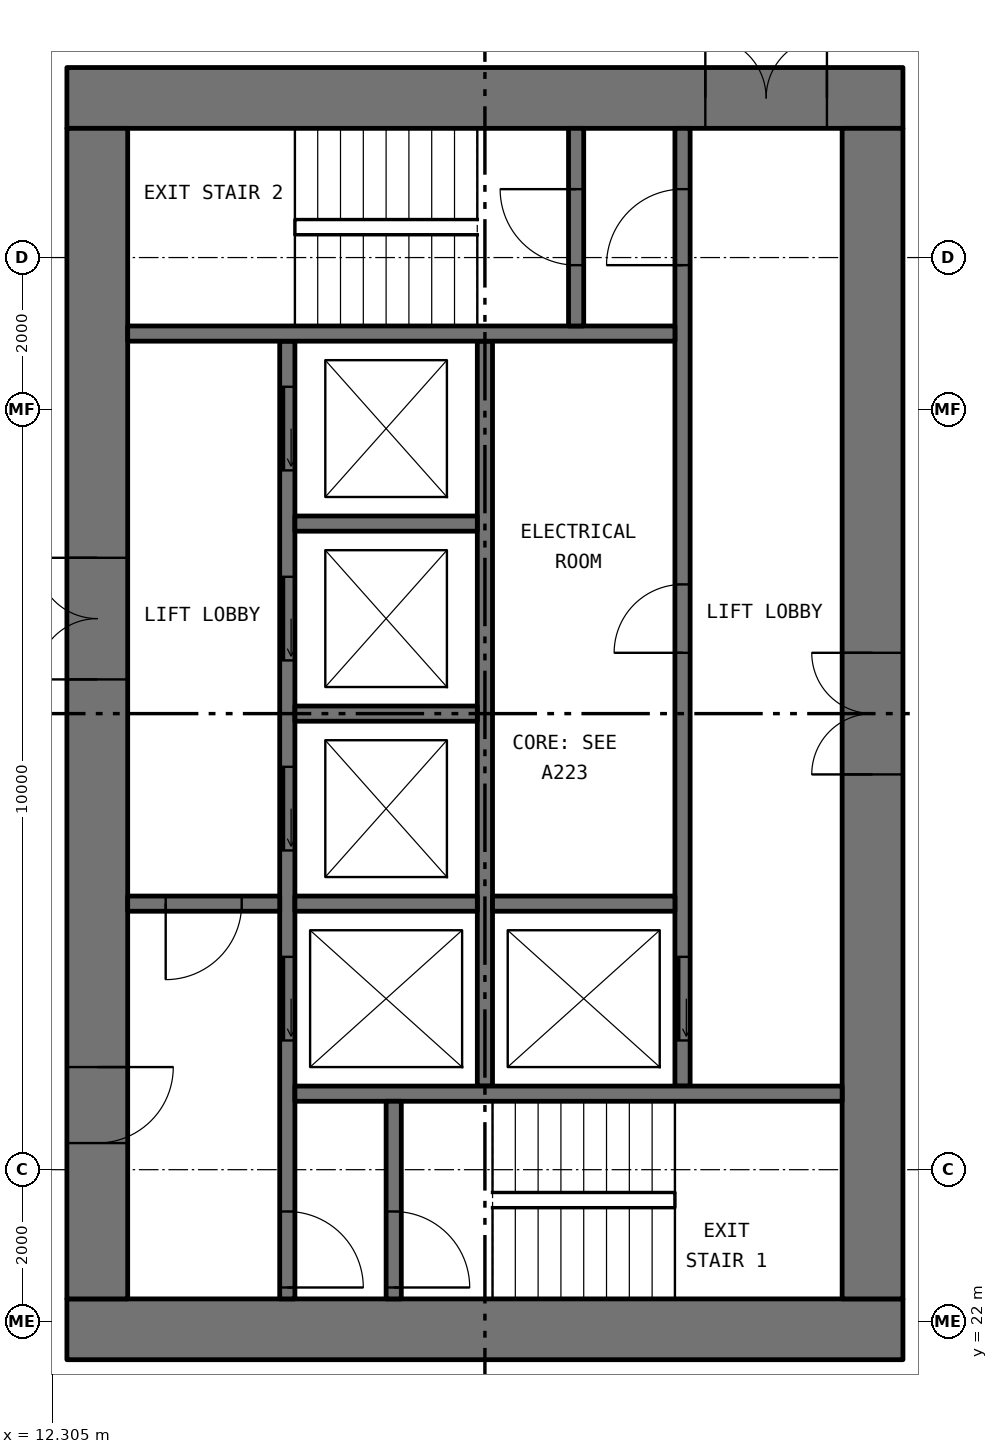
"""IFC4 building model, lengths in metres.
Left out: names, types, materials, properties, quantities, classifications, styles, units other than length and angle.
Written with IfcOpenShell. Run it as: python <this file> out.ifc"""

import sys

from ifc_helpers import new_model, si_unit, direction, frame, frame_2d, origin, place, context, subcontext, project, spatial, rectangle, extrude, element, fill, save


model = new_model("IFC4")
c1 = context("Model", 3, precision=1e-05, world=origin(), true_north=direction((0.0, 1.0)))
c2 = subcontext(c1, "Body", "Model", "MODEL_VIEW")
j1 = project(units=[si_unit("LENGTHUNIT", "METRE"), si_unit("PLANEANGLEUNIT", "RADIAN")], contexts=[c1])
p1 = place(None, origin())
s1 = spatial("IfcSite", under=j1, at=p1, CompositionType="ELEMENT")
p2 = place(p1, origin())
s2 = spatial("IfcBuilding", under=s1, at=p2, CompositionType="ELEMENT")
p3 = place(p2, frame((0.0, 0.0, 88.65)))
s3 = spatial("IfcBuildingStorey", under=s2, at=p3, CompositionType="ELEMENT", Elevation=88.65)
p4 = place(p3, frame((12.5, 21.9, 0.0), z_axis=(0.0, 0.0, 1.0), x_axis=(1.0, 0.0, 0.0)))
e1 = element("IfcWall", 1, at=p4, inside=s3, PredefinedType="SHEAR", context=c2, shape_type="SweptSolid", body=[
    extrude(rectangle(XDim=11.0, YDim=0.8, at=frame_2d((5.5, 0.0))), origin(), (0.0, 0.0, 1.0), 3.05),
])
p5 = place(p3, frame((12.5, 38.1, 0.0), z_axis=(0.0, 0.0, 1.0), x_axis=(1.0, 0.0, 0.0)))
e2 = element("IfcWall", 2, at=p5, inside=s3, PredefinedType="SHEAR", context=c2, shape_type="SweptSolid", body=[
    extrude(rectangle(XDim=11.0, YDim=0.8, at=frame_2d((5.5, 0.0))), origin(), (0.0, 0.0, 1.0), 3.05),
])
p6 = place(p5, frame((8.4, 0.0, 0.0)))
e3 = element("IfcOpeningElement", 3, at=p6, cuts=e2, PredefinedType="OPENING", context=c2, shape_type="SweptSolid", body=[
    extrude(rectangle(XDim=1.6, YDim=2.1, at=frame_2d((0.8, 1.05))), frame((0.0, 0.41, 0.0), z_axis=(0.0, -1.0, 0.0), x_axis=(1.0, 0.0, 0.0)), (0.0, 0.0, 1.0), 0.82),
])
p7 = place(p3, frame((12.9, 22.3, 0.0), z_axis=(0.0, 0.0, 1.0), x_axis=(0.0, 1.0, 0.0)))
e4 = element("IfcWall", 4, at=p7, inside=s3, PredefinedType="SHEAR", context=c2, shape_type="SweptSolid", body=[
    extrude(rectangle(XDim=15.4, YDim=0.8, at=frame_2d((7.7, 0.0))), origin(), (0.0, 0.0, 1.0), 3.05),
])
p8 = place(p7, frame((8.15, 0.0, 0.0)))
e5 = element("IfcOpeningElement", 5, at=p8, cuts=e4, PredefinedType="OPENING", context=c2, shape_type="SweptSolid", body=[
    extrude(rectangle(XDim=1.6, YDim=2.1, at=frame_2d((0.8, 1.05))), frame((0.0, 0.41, 0.0), z_axis=(0.0, -1.0, 0.0), x_axis=(1.0, 0.0, 0.0)), (0.0, 0.0, 1.0), 0.82),
])
p9 = place(p7, frame((2.05, 0.0, 0.0)))
e6 = element("IfcOpeningElement", 6, at=p9, cuts=e4, PredefinedType="OPENING", context=c2, shape_type="SweptSolid", body=[
    extrude(rectangle(XDim=1.0, YDim=2.1, at=frame_2d((0.5, 1.05))), frame((0.0, 0.41, 0.0), z_axis=(0.0, -1.0, 0.0), x_axis=(1.0, 0.0, 0.0)), (0.0, 0.0, 1.0), 0.82),
])
p10 = place(p3, frame((23.1, 22.3, 0.0), z_axis=(0.0, 0.0, 1.0), x_axis=(0.0, 1.0, 0.0)))
e7 = element("IfcWall", 7, at=p10, inside=s3, PredefinedType="SHEAR", context=c2, shape_type="SweptSolid", body=[
    extrude(rectangle(XDim=15.4, YDim=0.8, at=frame_2d((7.7, 0.0))), origin(), (0.0, 0.0, 1.0), 3.05),
])
p11 = place(p10, frame((6.9, 0.0, 0.0)))
e8 = element("IfcOpeningElement", 8, at=p11, cuts=e7, PredefinedType="OPENING", context=c2, shape_type="SweptSolid", body=[
    extrude(rectangle(XDim=1.6, YDim=2.1, at=frame_2d((0.8, 1.05))), frame((0.0, 0.41, 0.0), z_axis=(0.0, -1.0, 0.0), x_axis=(1.0, 0.0, 0.0)), (0.0, 0.0, 1.0), 0.82),
])
p12 = place(p3, frame((15.4, 22.3, 0.0), z_axis=(0.0, 0.0, 1.0), x_axis=(0.0, 1.0, 0.0)))
e9 = element("IfcWall", 9, at=p12, inside=s3, PredefinedType="SOLIDWALL", context=c2, shape_type="SweptSolid", body=[
    extrude(rectangle(XDim=12.6, YDim=0.2, at=frame_2d((6.3, 0.0))), origin(), (0.0, 0.0, 1.0), 3.05),
])
p13 = place(p12, frame((3.4, 0.0, 0.0)))
e10 = element("IfcOpeningElement", 10, at=p13, cuts=e9, PredefinedType="OPENING", context=c2, shape_type="SweptSolid", body=[
    extrude(rectangle(XDim=1.1, YDim=2.1, at=frame_2d((0.55, 1.05))), frame((0.0, 0.11, 0.0), z_axis=(0.0, -1.0, 0.0), x_axis=(1.0, 0.0, 0.0)), (0.0, 0.0, 1.0), 0.22),
])
p14 = place(p12, frame((5.9, 0.0, 0.0)))
e11 = element("IfcOpeningElement", 11, at=p14, cuts=e9, PredefinedType="OPENING", context=c2, shape_type="SweptSolid", body=[
    extrude(rectangle(XDim=1.1, YDim=2.1, at=frame_2d((0.55, 1.05))), frame((0.0, 0.11, 0.0), z_axis=(0.0, -1.0, 0.0), x_axis=(1.0, 0.0, 0.0)), (0.0, 0.0, 1.0), 0.22),
])
p15 = place(p12, frame((8.4, 0.0, 0.0)))
e12 = element("IfcOpeningElement", 12, at=p15, cuts=e9, PredefinedType="OPENING", context=c2, shape_type="SweptSolid", body=[
    extrude(rectangle(XDim=1.1, YDim=2.1, at=frame_2d((0.55, 1.05))), frame((0.0, 0.11, 0.0), z_axis=(0.0, -1.0, 0.0), x_axis=(1.0, 0.0, 0.0)), (0.0, 0.0, 1.0), 0.22),
])
p16 = place(p12, frame((10.9, 0.0, 0.0)))
e13 = element("IfcOpeningElement", 13, at=p16, cuts=e9, PredefinedType="OPENING", context=c2, shape_type="SweptSolid", body=[
    extrude(rectangle(XDim=1.1, YDim=2.1, at=frame_2d((0.55, 1.05))), frame((0.0, 0.11, 0.0), z_axis=(0.0, -1.0, 0.0), x_axis=(1.0, 0.0, 0.0)), (0.0, 0.0, 1.0), 0.22),
])
p17 = place(p12, frame((0.15, 0.0, 0.0)))
e14 = element("IfcOpeningElement", 14, at=p17, cuts=e9, PredefinedType="OPENING", context=c2, shape_type="SweptSolid", body=[
    extrude(rectangle(XDim=1.0, YDim=2.1, at=frame_2d((0.5, 1.05))), frame((0.0, 0.11, 0.0), z_axis=(0.0, -1.0, 0.0), x_axis=(1.0, 0.0, 0.0)), (0.0, 0.0, 1.0), 0.22),
])
p18 = place(p3, frame((20.6, 25.1, 0.0), z_axis=(0.0, 0.0, 1.0), x_axis=(0.0, 1.0, 0.0)))
e15 = element("IfcWall", 15, at=p18, inside=s3, PredefinedType="SOLIDWALL", context=c2, shape_type="SweptSolid", body=[
    extrude(rectangle(XDim=12.6, YDim=0.2, at=frame_2d((6.3, 0.0))), origin(), (0.0, 0.0, 1.0), 3.05),
])
p19 = place(p18, frame((0.6, 0.0, 0.0)))
e16 = element("IfcOpeningElement", 16, at=p19, cuts=e15, PredefinedType="OPENING", context=c2, shape_type="SweptSolid", body=[
    extrude(rectangle(XDim=1.1, YDim=2.1, at=frame_2d((0.55, 1.05))), frame((0.0, 0.11, 0.0), z_axis=(0.0, -1.0, 0.0), x_axis=(1.0, 0.0, 0.0)), (0.0, 0.0, 1.0), 0.22),
])
p20 = place(p18, frame((10.8, 0.0, 0.0)))
e17 = element("IfcOpeningElement", 17, at=p20, cuts=e15, PredefinedType="OPENING", context=c2, shape_type="SweptSolid", body=[
    extrude(rectangle(XDim=1.0, YDim=2.1, at=frame_2d((0.5, 1.05))), frame((0.0, 0.11, 0.0), z_axis=(0.0, -1.0, 0.0), x_axis=(1.0, 0.0, 0.0)), (0.0, 0.0, 1.0), 0.22),
])
p21 = place(p18, frame((5.7, 0.0, 0.0)))
e18 = element("IfcOpeningElement", 18, at=p21, cuts=e15, PredefinedType="OPENING", context=c2, shape_type="SweptSolid", body=[
    extrude(rectangle(XDim=0.9, YDim=2.1, at=frame_2d((0.45, 1.05))), frame((0.0, 0.11, 0.0), z_axis=(0.0, -1.0, 0.0), x_axis=(1.0, 0.0, 0.0)), (0.0, 0.0, 1.0), 0.22),
])
p22 = place(p3, frame((18.0, 25.1, 0.0), z_axis=(0.0, 0.0, 1.0), x_axis=(0.0, 1.0, 0.0)))
e19 = element("IfcWall", 19, at=p22, inside=s3, PredefinedType="SOLIDWALL", context=c2, shape_type="SweptSolid", body=[
    extrude(rectangle(XDim=9.8, YDim=0.2, at=frame_2d((4.9, 0.0))), origin(), (0.0, 0.0, 1.0), 3.05),
])
for number, where, z_axis, x_axis in (
    (20, (15.5, 25.0, 0.0), (0.0, 0.0, 1.0), (1.0, 0.0, 0.0)),
    (21, (13.3, 35.0, 0.0), (0.0, 0.0, 1.0), (1.0, 0.0, 0.0)),
):
    element("IfcWall", number, at=place(p3, frame(where, z_axis=z_axis, x_axis=x_axis)), inside=s3, PredefinedType="SOLIDWALL", context=c2, shape_type="SweptSolid", body=[
        extrude(rectangle(XDim=7.2, YDim=0.2, at=frame_2d((3.6, 0.0))), origin(), (0.0, 0.0, 1.0), 3.05),
    ])
p23 = place(p3, frame((13.3, 27.5, 0.0), z_axis=(0.0, 0.0, 1.0), x_axis=(1.0, 0.0, 0.0)))
e22 = element("IfcWall", 22, at=p23, inside=s3, PredefinedType="SOLIDWALL", context=c2, shape_type="SweptSolid", body=[
    extrude(rectangle(XDim=2.0, YDim=0.2, at=frame_2d((1.0, 0.0))), origin(), (0.0, 0.0, 1.0), 3.05),
])
p24 = place(p23, frame((0.5, 0.0, 0.0)))
e23 = element("IfcOpeningElement", 23, at=p24, cuts=e22, PredefinedType="OPENING", context=c2, shape_type="SweptSolid", body=[
    extrude(rectangle(XDim=1.0, YDim=2.1, at=frame_2d((0.5, 1.05))), frame((0.0, 0.11, 0.0), z_axis=(0.0, -1.0, 0.0), x_axis=(1.0, 0.0, 0.0)), (0.0, 0.0, 1.0), 0.22),
])
p25 = place(p3, frame((16.8, 22.3, 0.0), z_axis=(0.0, 0.0, 1.0), x_axis=(0.0, 1.0, 0.0)))
e24 = element("IfcWall", 24, at=p25, inside=s3, PredefinedType="SOLIDWALL", context=c2, shape_type="SweptSolid", body=[
    extrude(rectangle(XDim=2.6, YDim=0.2, at=frame_2d((1.3, 0.0))), origin(), (0.0, 0.0, 1.0), 3.05),
])
p26 = place(p25, frame((0.15, 0.0, 0.0)))
e25 = element("IfcOpeningElement", 25, at=p26, cuts=e24, PredefinedType="OPENING", context=c2, shape_type="SweptSolid", body=[
    extrude(rectangle(XDim=1.0, YDim=2.1, at=frame_2d((0.5, 1.05))), frame((0.0, 0.11, 0.0), z_axis=(0.0, -1.0, 0.0), x_axis=(1.0, 0.0, 0.0)), (0.0, 0.0, 1.0), 0.22),
])
p27 = place(p3, frame((19.2, 35.1, 0.0), z_axis=(0.0, 0.0, 1.0), x_axis=(0.0, 1.0, 0.0)))
e26 = element("IfcWall", 26, at=p27, inside=s3, PredefinedType="SOLIDWALL", context=c2, shape_type="SweptSolid", body=[
    extrude(rectangle(XDim=2.6, YDim=0.2, at=frame_2d((1.3, 0.0))), origin(), (0.0, 0.0, 1.0), 3.05),
])
p28 = place(p27, frame((0.8, 0.0, 0.0)))
e27 = element("IfcOpeningElement", 27, at=p28, cuts=e26, PredefinedType="OPENING", context=c2, shape_type="SweptSolid", body=[
    extrude(rectangle(XDim=1.0, YDim=2.1, at=frame_2d((0.5, 1.05))), frame((0.0, 0.11, 0.0), z_axis=(0.0, -1.0, 0.0), x_axis=(1.0, 0.0, 0.0)), (0.0, 0.0, 1.0), 0.22),
])
for number, where, z_axis, x_axis in (
    (28, (15.5, 27.5, 0.0), (0.0, 0.0, 1.0), (1.0, 0.0, 0.0)),
    (29, (15.5, 30.0, 0.0), (0.0, 0.0, 1.0), (1.0, 0.0, 0.0)),
    (30, (15.5, 32.5, 0.0), (0.0, 0.0, 1.0), (1.0, 0.0, 0.0)),
    (31, (18.1, 27.5, 0.0), (0.0, 0.0, 1.0), (1.0, 0.0, 0.0)),
):
    element("IfcWall", number, at=place(p3, frame(where, z_axis=z_axis, x_axis=x_axis)), inside=s3, PredefinedType="SOLIDWALL", context=c2, shape_type="SweptSolid", body=[
        extrude(rectangle(XDim=2.4, YDim=0.2, at=frame_2d((1.2, 0.0))), origin(), (0.0, 0.0, 1.0), 3.05),
    ])
p29 = place(p19, origin())
e32 = element("IfcDoor", 32, at=p29, inside=s3, OperationType="SLIDING_TO_LEFT", PredefinedType="DOOR", context=c2, shape_type="SweptSolid", body=[
    extrude(rectangle(XDim=1.1, YDim=2.1, at=frame_2d((0.55, 1.05))), frame((0.0, 0.025, 0.0), z_axis=(0.0, -1.0, 0.0), x_axis=(1.0, 0.0, 0.0)), (0.0, 0.0, 1.0), 0.05),
])
fill(e16, e32)
p30 = place(p13, origin())
e33 = element("IfcDoor", 33, at=p30, inside=s3, OperationType="SLIDING_TO_LEFT", PredefinedType="DOOR", context=c2, shape_type="SweptSolid", body=[
    extrude(rectangle(XDim=1.1, YDim=2.1, at=frame_2d((0.55, 1.05))), frame((0.0, 0.025, 0.0), z_axis=(0.0, -1.0, 0.0), x_axis=(1.0, 0.0, 0.0)), (0.0, 0.0, 1.0), 0.05),
])
fill(e10, e33)
p31 = place(p14, origin())
e34 = element("IfcDoor", 34, at=p31, inside=s3, OperationType="SLIDING_TO_LEFT", PredefinedType="DOOR", context=c2, shape_type="SweptSolid", body=[
    extrude(rectangle(XDim=1.1, YDim=2.1, at=frame_2d((0.55, 1.05))), frame((0.0, 0.025, 0.0), z_axis=(0.0, -1.0, 0.0), x_axis=(1.0, 0.0, 0.0)), (0.0, 0.0, 1.0), 0.05),
])
fill(e11, e34)
p32 = place(p15, origin())
e35 = element("IfcDoor", 35, at=p32, inside=s3, OperationType="SLIDING_TO_LEFT", PredefinedType="DOOR", context=c2, shape_type="SweptSolid", body=[
    extrude(rectangle(XDim=1.1, YDim=2.1, at=frame_2d((0.55, 1.05))), frame((0.0, 0.025, 0.0), z_axis=(0.0, -1.0, 0.0), x_axis=(1.0, 0.0, 0.0)), (0.0, 0.0, 1.0), 0.05),
])
fill(e12, e35)
p33 = place(p16, origin())
e36 = element("IfcDoor", 36, at=p33, inside=s3, OperationType="SLIDING_TO_LEFT", PredefinedType="DOOR", context=c2, shape_type="SweptSolid", body=[
    extrude(rectangle(XDim=1.1, YDim=2.1, at=frame_2d((0.55, 1.05))), frame((0.0, 0.025, 0.0), z_axis=(0.0, -1.0, 0.0), x_axis=(1.0, 0.0, 0.0)), (0.0, 0.0, 1.0), 0.05),
])
fill(e13, e36)
p34 = place(p26, frame((1.0, 0.0, 0.0), x_axis=(-1.0, 0.0, 0.0)))
e37 = element("IfcDoor", 37, at=p34, inside=s3, OperationType="SINGLE_SWING_LEFT", PredefinedType="DOOR", context=c2, shape_type="SweptSolid", body=[
    extrude(rectangle(XDim=1.0, YDim=2.1, at=frame_2d((0.5, 1.05))), frame((0.0, 0.025, 0.0), z_axis=(0.0, -1.0, 0.0), x_axis=(1.0, 0.0, 0.0)), (0.0, 0.0, 1.0), 0.05),
])
fill(e25, e37)
p35 = place(p17, frame((1.0, 0.0, 0.0), x_axis=(-1.0, 0.0, 0.0)))
e38 = element("IfcDoor", 38, at=p35, inside=s3, OperationType="SINGLE_SWING_LEFT", PredefinedType="DOOR", context=c2, shape_type="SweptSolid", body=[
    extrude(rectangle(XDim=1.0, YDim=2.1, at=frame_2d((0.5, 1.05))), frame((0.0, 0.025, 0.0), z_axis=(0.0, -1.0, 0.0), x_axis=(1.0, 0.0, 0.0)), (0.0, 0.0, 1.0), 0.05),
])
fill(e14, e38)
p36 = place(p20, origin())
e39 = element("IfcDoor", 39, at=p36, inside=s3, OperationType="SINGLE_SWING_RIGHT", PredefinedType="DOOR", context=c2, shape_type="SweptSolid", body=[
    extrude(rectangle(XDim=1.0, YDim=2.1, at=frame_2d((0.5, 1.05))), frame((0.0, 0.025, 0.0), z_axis=(0.0, -1.0, 0.0), x_axis=(1.0, 0.0, 0.0)), (0.0, 0.0, 1.0), 0.05),
])
fill(e17, e39)
p37 = place(p28, origin())
e40 = element("IfcDoor", 40, at=p37, inside=s3, OperationType="SINGLE_SWING_LEFT", PredefinedType="DOOR", context=c2, shape_type="SweptSolid", body=[
    extrude(rectangle(XDim=1.0, YDim=2.1, at=frame_2d((0.5, 1.05))), frame((0.0, 0.025, 0.0), z_axis=(0.0, -1.0, 0.0), x_axis=(1.0, 0.0, 0.0)), (0.0, 0.0, 1.0), 0.05),
])
fill(e27, e40)
p38 = place(p24, frame((1.0, 0.0, 0.0), x_axis=(-1.0, 0.0, 0.0)))
e41 = element("IfcDoor", 41, at=p38, inside=s3, OperationType="SINGLE_SWING_LEFT", PredefinedType="DOOR", context=c2, shape_type="SweptSolid", body=[
    extrude(rectangle(XDim=1.0, YDim=2.1, at=frame_2d((0.5, 1.05))), frame((0.0, 0.025, 0.0), z_axis=(0.0, -1.0, 0.0), x_axis=(1.0, 0.0, 0.0)), (0.0, 0.0, 1.0), 0.05),
])
fill(e23, e41)
p39 = place(p8, origin())
e42 = element("IfcDoor", 42, at=p39, inside=s3, OperationType="DOUBLE_DOOR_SINGLE_SWING", PredefinedType="DOOR", context=c2, shape_type="SweptSolid", body=[
    extrude(rectangle(XDim=1.6, YDim=2.1, at=frame_2d((0.8, 1.05))), frame((0.0, 0.025, 0.0), z_axis=(0.0, -1.0, 0.0), x_axis=(1.0, 0.0, 0.0)), (0.0, 0.0, 1.0), 0.05),
])
fill(e5, e42)
p40 = place(p9, frame((1.0, 0.0, 0.0), x_axis=(-1.0, 0.0, 0.0)))
e43 = element("IfcDoor", 43, at=p40, inside=s3, OperationType="SINGLE_SWING_RIGHT", PredefinedType="DOOR", context=c2, shape_type="SweptSolid", body=[
    extrude(rectangle(XDim=1.0, YDim=2.1, at=frame_2d((0.5, 1.05))), frame((0.0, 0.025, 0.0), z_axis=(0.0, -1.0, 0.0), x_axis=(1.0, 0.0, 0.0)), (0.0, 0.0, 1.0), 0.05),
])
fill(e6, e43)
p41 = place(p6, origin())
e44 = element("IfcDoor", 44, at=p41, inside=s3, OperationType="DOUBLE_DOOR_SINGLE_SWING", PredefinedType="DOOR", context=c2, shape_type="SweptSolid", body=[
    extrude(rectangle(XDim=1.6, YDim=2.1, at=frame_2d((0.8, 1.05))), frame((0.0, 0.025, 0.0), z_axis=(0.0, -1.0, 0.0), x_axis=(1.0, 0.0, 0.0)), (0.0, 0.0, 1.0), 0.05),
])
fill(e3, e44)
p42 = place(p11, origin())
e45 = element("IfcDoor", 45, at=p42, inside=s3, OperationType="DOUBLE_DOOR_SINGLE_SWING", PredefinedType="DOOR", context=c2, shape_type="SweptSolid", body=[
    extrude(rectangle(XDim=1.6, YDim=2.1, at=frame_2d((0.8, 1.05))), frame((0.0, 0.025, 0.0), z_axis=(0.0, -1.0, 0.0), x_axis=(1.0, 0.0, 0.0)), (0.0, 0.0, 1.0), 0.05),
])
fill(e8, e45)
p43 = place(p21, origin())
e46 = element("IfcDoor", 46, at=p43, inside=s3, OperationType="SINGLE_SWING_RIGHT", PredefinedType="DOOR", context=c2, shape_type="SweptSolid", body=[
    extrude(rectangle(XDim=0.9, YDim=2.1, at=frame_2d((0.45, 1.05))), frame((0.0, 0.025, 0.0), z_axis=(0.0, -1.0, 0.0), x_axis=(1.0, 0.0, 0.0)), (0.0, 0.0, 1.0), 0.05),
])
fill(e18, e46)
save(model, sys.argv[1])
